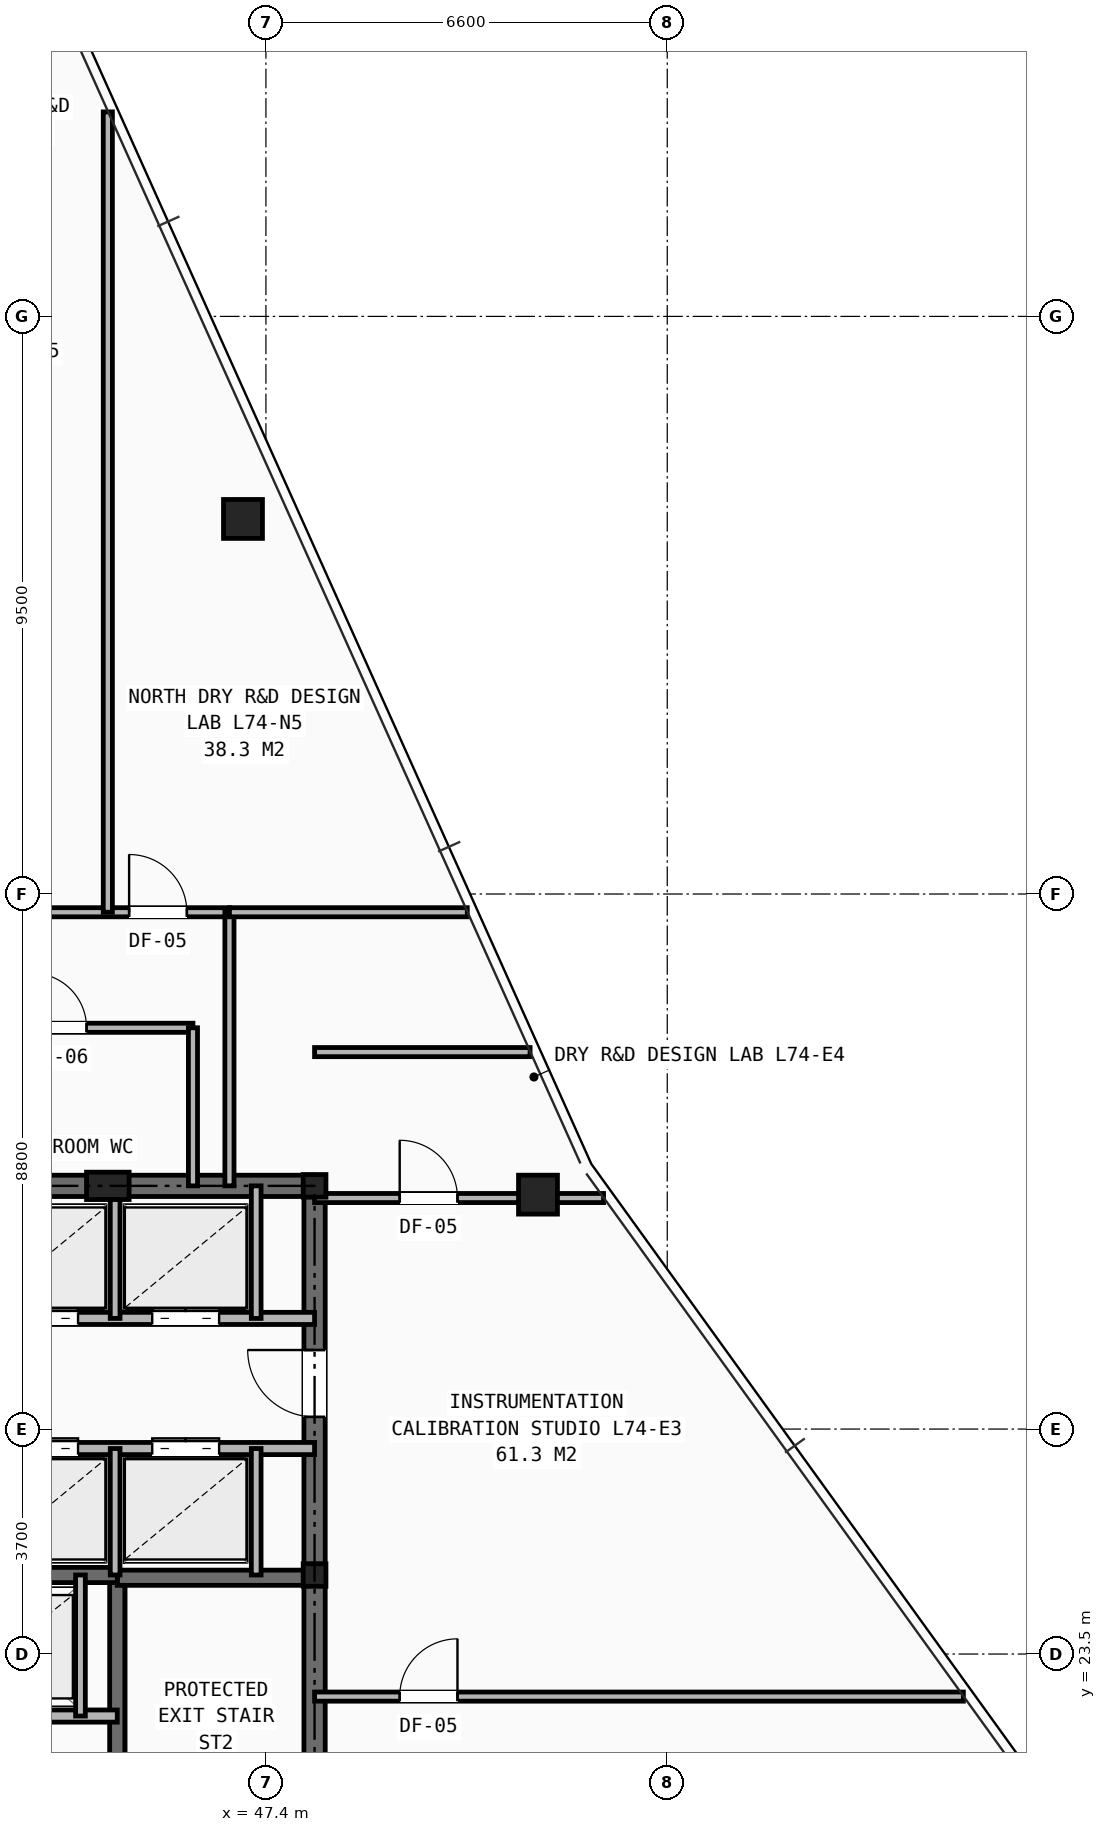
"""IFC4 building model, lengths in metres.
Left out: names, types, materials, properties, quantities, classifications, styles, units other than length and angle.
Written with IfcOpenShell. Run it as: python <this file> out.ifc"""

import sys

from ifc_helpers import new_model, si_unit, direction, frame, frame_2d, origin, origin_2d, place, context, subcontext, project, spatial, rectangle, hollow_rectangle, i_section, extrude, element, fill, save


model = new_model("IFC4")
c1 = context("Model", 3, precision=1e-05, world=origin(), true_north=direction((0.0, 1.0)))
c2 = subcontext(c1, "Body", "Model", "MODEL_VIEW")
j1 = project(units=[si_unit("LENGTHUNIT", "METRE"), si_unit("PLANEANGLEUNIT", "RADIAN")], contexts=[c1])
p1 = place(None, origin())
s1 = spatial("IfcSite", under=j1, at=p1, CompositionType="ELEMENT")
p2 = place(p1, origin())
s2 = spatial("IfcBuilding", under=s1, at=p2, CompositionType="ELEMENT")
p3 = place(p2, frame((0.0, 0.0, 262.0)))
s3 = spatial("IfcBuildingStorey", under=s2, at=p3, CompositionType="ELEMENT", Elevation=262.0)
for number, where, z_axis, x_axis in (
    (1, (48.2, 24.8, 0.0), (0.0, 0.0, 1.0), (1.0, 0.0, 0.0)),
    (2, (48.2, 31.2, 0.0), (0.0, 0.0, 1.0), (1.0, 0.0, 0.0)),
):
    element("IfcColumn", number, at=place(p3, frame(where, z_axis=z_axis, x_axis=x_axis)), inside=s3, PredefinedType="COLUMN", context=c2, shape_type="SweptSolid", body=[
        extrude(i_section(OverallWidth=0.374, OverallDepth=0.372, WebThickness=0.016, FlangeThickness=0.026, at=origin_2d()), origin(), (0.0, 0.0, 1.0), 3.5),
    ])
p4 = place(p3, frame((44.8, 31.2, 0.0), z_axis=(0.0, 0.0, 1.0), x_axis=(1.0, 0.0, 0.0)))
e3 = element("IfcColumn", 3, at=p4, inside=s3, PredefinedType="PILASTER", context=c2, shape_type="SweptSolid", body=[
    extrude(rectangle(XDim=0.7, YDim=0.45, at=origin_2d()), origin(), (0.0, 0.0, 1.0), 3.5),
])
for number, where, z_axis, x_axis in (
    (4, (51.874, 31.056, 0.0), (0.0, 0.0, 1.0), (1.0, 0.0, 0.0)),
    (5, (47.023, 42.169, 0.0), (0.0, 0.0, 1.0), (1.0, 0.0, 0.0)),
):
    element("IfcColumn", number, at=place(p3, frame(where, z_axis=z_axis, x_axis=x_axis)), inside=s3, PredefinedType="COLUMN", context=c2, shape_type="SweptSolid", body=[
        extrude(hollow_rectangle(XDim=0.64, YDim=0.64, WallThickness=0.045, at=origin_2d()), origin(), (0.0, 0.0, 1.0), 3.5),
    ])
p5 = place(p3, frame((31.8, 31.2, 0.0), z_axis=(0.0, 0.0, 1.0), x_axis=(1.0, 0.0, 0.0)))
e6 = element("IfcWall", 6, at=p5, inside=s3, PredefinedType="SHEAR", context=c2, shape_type="SweptSolid", body=[
    extrude(rectangle(XDim=16.4, YDim=0.35, at=frame_2d((8.2, 0.0))), origin(), (0.0, 0.0, 1.0), 3.25),
])
p6 = place(p3, frame((48.2, 16.4, 0.0), z_axis=(0.0, 0.0, 1.0), x_axis=(0.0, 1.0, 0.0)))
e7 = element("IfcWall", 7, at=p6, inside=s3, PredefinedType="SHEAR", context=c2, shape_type="SweptSolid", body=[
    extrude(rectangle(XDim=14.8, YDim=0.35, at=frame_2d((7.4, 0.0))), origin(), (0.0, 0.0, 1.0), 3.25),
])
p7 = place(p6, frame((11.0, 0.0, 0.0)))
e8 = element("IfcOpeningElement", 8, at=p7, cuts=e7, PredefinedType="OPENING", context=c2, shape_type="SweptSolid", body=[
    extrude(rectangle(XDim=1.1, YDim=2.15, at=frame_2d((0.55, 1.075))), frame((0.0, 0.185, 0.0), z_axis=(0.0, -1.0, 0.0), x_axis=(1.0, 0.0, 0.0)), (0.0, 0.0, 1.0), 0.37),
])
p8 = place(p3, frame((44.955, 16.4, 0.0), z_axis=(0.0, 0.0, 1.0), x_axis=(0.0, 1.0, 0.0)))
e9 = element("IfcWall", 9, at=p8, inside=s3, PredefinedType="SHEAR", context=c2, shape_type="SweptSolid", body=[
    extrude(rectangle(XDim=8.4, YDim=0.25, at=frame_2d((4.2, 0.0))), origin(), (0.0, 0.0, 1.0), 3.25),
])
p9 = place(p8, frame((0.45, 0.0, 0.0)))
e10 = element("IfcOpeningElement", 10, at=p9, cuts=e9, PredefinedType="OPENING", context=c2, shape_type="SweptSolid", body=[
    extrude(rectangle(XDim=0.95, YDim=2.1, at=frame_2d((0.475, 1.05))), frame((0.0, 0.135, 0.0), z_axis=(0.0, -1.0, 0.0), x_axis=(1.0, 0.0, 0.0)), (0.0, 0.0, 1.0), 0.27),
])
p10 = place(p3, frame((44.955, 24.755, 0.0), z_axis=(0.0, 0.0, 1.0), x_axis=(1.0, 0.0, 0.0)))
e11 = element("IfcWall", 11, at=p10, inside=s3, PredefinedType="SHEAR", context=c2, shape_type="SweptSolid", body=[
    extrude(rectangle(XDim=3.245, YDim=0.25, at=frame_2d((1.623, 0.0))), origin(), (0.0, 0.0, 1.0), 3.25),
])
p11 = place(p3, frame((35.045, 24.8, 0.0), z_axis=(0.0, 0.0, 1.0), x_axis=(1.0, 0.0, 0.0)))
e12 = element("IfcWall", 12, at=p11, inside=s3, PredefinedType="SHEAR", context=c2, shape_type="SweptSolid", body=[
    extrude(rectangle(XDim=9.91, YDim=0.25, at=frame_2d((4.955, 0.0))), origin(), (0.0, 0.0, 1.0), 3.25),
])
p12 = place(p3, frame((35.045, 22.48, 0.0), z_axis=(0.0, 0.0, 1.0), x_axis=(1.0, 0.0, 0.0)))
e13 = element("IfcWall", 13, at=p12, inside=s3, PredefinedType="SOLIDWALL", context=c2, shape_type="SweptSolid", body=[
    extrude(rectangle(XDim=9.91, YDim=0.2, at=frame_2d((4.955, 0.0))), origin(), (0.0, 0.0, 1.0), 3.25),
])
p13 = place(p12, frame((1.255, 0.0, 0.0)))
e14 = element("IfcOpeningElement", 14, at=p13, cuts=e13, PredefinedType="OPENING", context=c2, shape_type="SweptSolid", body=[
    extrude(rectangle(XDim=1.1, YDim=2.15, at=frame_2d((0.55, 1.075))), frame((0.0, 0.11, 0.0), z_axis=(0.0, -1.0, 0.0), x_axis=(1.0, 0.0, 0.0)), (0.0, 0.0, 1.0), 0.22),
])
p14 = place(p12, frame((7.555, 0.0, 0.0)))
e15 = element("IfcOpeningElement", 15, at=p14, cuts=e13, PredefinedType="OPENING", context=c2, shape_type="SweptSolid", body=[
    extrude(rectangle(XDim=1.1, YDim=2.15, at=frame_2d((0.55, 1.075))), frame((0.0, 0.11, 0.0), z_axis=(0.0, -1.0, 0.0), x_axis=(1.0, 0.0, 0.0)), (0.0, 0.0, 1.0), 0.22),
])
p15 = place(p12, frame((4.405, 0.0, 0.0)))
e16 = element("IfcOpeningElement", 16, at=p15, cuts=e13, PredefinedType="OPENING", context=c2, shape_type="SweptSolid", body=[
    extrude(rectangle(XDim=1.1, YDim=2.15, at=frame_2d((0.55, 1.075))), frame((0.0, 0.11, 0.0), z_axis=(0.0, -1.0, 0.0), x_axis=(1.0, 0.0, 0.0)), (0.0, 0.0, 1.0), 0.22),
])
p16 = place(p3, frame((44.35, 22.48, 0.0), z_axis=(0.0, 0.0, 1.0), x_axis=(0.0, 1.0, 0.0)))
e17 = element("IfcWall", 17, at=p16, inside=s3, PredefinedType="SOLIDWALL", context=c2, shape_type="SweptSolid", body=[
    extrude(rectangle(XDim=2.32, YDim=0.16, at=frame_2d((1.16, 0.0))), origin(), (0.0, 0.0, 1.0), 3.25),
])
p17 = place(p3, frame((31.8, 29.02, 0.0), z_axis=(0.0, 0.0, 1.0), x_axis=(1.0, 0.0, 0.0)))
e18 = element("IfcWall", 18, at=p17, inside=s3, PredefinedType="SOLIDWALL", context=c2, shape_type="SweptSolid", body=[
    extrude(rectangle(XDim=16.4, YDim=0.2, at=frame_2d((8.2, 0.0))), origin(), (0.0, 0.0, 1.0), 2.705),
])
p18 = place(p17, frame((0.55, 0.0, 0.0)))
e19 = element("IfcOpeningElement", 19, at=p18, cuts=e18, PredefinedType="OPENING", context=c2, shape_type="SweptSolid", body=[
    extrude(rectangle(XDim=0.85, YDim=2.05, at=frame_2d((0.425, 1.025))), frame((0.0, 0.11, 0.0), z_axis=(0.0, -1.0, 0.0), x_axis=(1.0, 0.0, 0.0)), (0.0, 0.0, 1.0), 0.22),
])
p19 = place(p17, frame((5.94, 0.0, 0.0)))
e20 = element("IfcOpeningElement", 20, at=p19, cuts=e18, PredefinedType="OPENING", context=c2, shape_type="SweptSolid", body=[
    extrude(rectangle(XDim=0.9, YDim=2.1, at=frame_2d((0.45, 1.05))), frame((0.0, 0.11, 0.0), z_axis=(0.0, -1.0, 0.0), x_axis=(1.0, 0.0, 0.0)), (0.0, 0.0, 1.0), 0.22),
])
p20 = place(p17, frame((11.41, 0.0, 0.0)))
e21 = element("IfcOpeningElement", 21, at=p20, cuts=e18, PredefinedType="OPENING", context=c2, shape_type="SweptSolid", body=[
    extrude(rectangle(XDim=1.1, YDim=2.15, at=frame_2d((0.55, 1.075))), frame((0.0, 0.11, 0.0), z_axis=(0.0, -1.0, 0.0), x_axis=(1.0, 0.0, 0.0)), (0.0, 0.0, 1.0), 0.22),
])
p21 = place(p17, frame((13.73, 0.0, 0.0)))
e22 = element("IfcOpeningElement", 22, at=p21, cuts=e18, PredefinedType="OPENING", context=c2, shape_type="SweptSolid", body=[
    extrude(rectangle(XDim=1.1, YDim=2.15, at=frame_2d((0.55, 1.075))), frame((0.0, 0.11, 0.0), z_axis=(0.0, -1.0, 0.0), x_axis=(1.0, 0.0, 0.0)), (0.0, 0.0, 1.0), 0.22),
])
p22 = place(p3, frame((31.8, 26.88, 0.0), z_axis=(0.0, 0.0, 1.0), x_axis=(1.0, 0.0, 0.0)))
e23 = element("IfcWall", 23, at=p22, inside=s3, PredefinedType="SOLIDWALL", context=c2, shape_type="SweptSolid", body=[
    extrude(rectangle(XDim=16.4, YDim=0.2, at=frame_2d((8.2, 0.0))), origin(), (0.0, 0.0, 1.0), 2.705),
])
p23 = place(p22, frame((0.55, 0.0, 0.0)))
e24 = element("IfcOpeningElement", 24, at=p23, cuts=e23, PredefinedType="OPENING", context=c2, shape_type="SweptSolid", body=[
    extrude(rectangle(XDim=0.85, YDim=2.05, at=frame_2d((0.425, 1.025))), frame((0.0, 0.11, 0.0), z_axis=(0.0, -1.0, 0.0), x_axis=(1.0, 0.0, 0.0)), (0.0, 0.0, 1.0), 0.22),
])
p24 = place(p22, frame((5.94, 0.0, 0.0)))
e25 = element("IfcOpeningElement", 25, at=p24, cuts=e23, PredefinedType="OPENING", context=c2, shape_type="SweptSolid", body=[
    extrude(rectangle(XDim=0.9, YDim=2.1, at=frame_2d((0.45, 1.05))), frame((0.0, 0.11, 0.0), z_axis=(0.0, -1.0, 0.0), x_axis=(1.0, 0.0, 0.0)), (0.0, 0.0, 1.0), 0.22),
])
p25 = place(p22, frame((11.41, 0.0, 0.0)))
e26 = element("IfcOpeningElement", 26, at=p25, cuts=e23, PredefinedType="OPENING", context=c2, shape_type="SweptSolid", body=[
    extrude(rectangle(XDim=1.1, YDim=2.15, at=frame_2d((0.55, 1.075))), frame((0.0, 0.11, 0.0), z_axis=(0.0, -1.0, 0.0), x_axis=(1.0, 0.0, 0.0)), (0.0, 0.0, 1.0), 0.22),
])
p26 = place(p22, frame((13.73, 0.0, 0.0)))
e27 = element("IfcOpeningElement", 27, at=p26, cuts=e23, PredefinedType="OPENING", context=c2, shape_type="SweptSolid", body=[
    extrude(rectangle(XDim=1.1, YDim=2.15, at=frame_2d((0.55, 1.075))), frame((0.0, 0.11, 0.0), z_axis=(0.0, -1.0, 0.0), x_axis=(1.0, 0.0, 0.0)), (0.0, 0.0, 1.0), 0.22),
])
for number, where, z_axis, x_axis in (
    (28, (44.92, 29.02, 0.0), (0.0, 0.0, 1.0), (0.0, 1.0, 0.0)),
    (29, (47.24, 29.02, 0.0), (0.0, 0.0, 1.0), (0.0, 1.0, 0.0)),
):
    element("IfcWall", number, at=place(p3, frame(where, z_axis=z_axis, x_axis=x_axis)), inside=s3, PredefinedType="SOLIDWALL", context=c2, shape_type="SweptSolid", body=[
        extrude(rectangle(XDim=2.18, YDim=0.16, at=frame_2d((1.09, 0.0))), origin(), (0.0, 0.0, 1.0), 2.705),
    ])
for number, where, z_axis, x_axis in (
    (30, (44.92, 24.8, 0.0), (0.0, 0.0, 1.0), (0.0, 1.0, 0.0)),
    (31, (47.24, 24.8, 0.0), (0.0, 0.0, 1.0), (0.0, 1.0, 0.0)),
):
    element("IfcWall", number, at=place(p3, frame(where, z_axis=z_axis, x_axis=x_axis)), inside=s3, PredefinedType="SOLIDWALL", context=c2, shape_type="SweptSolid", body=[
        extrude(rectangle(XDim=2.08, YDim=0.16, at=frame_2d((1.04, 0.0))), origin(), (0.0, 0.0, 1.0), 3.25),
    ])
p27 = place(p3, frame((33.2, 33.8, 0.0), z_axis=(0.0, 0.0, 1.0), x_axis=(1.0, 0.0, 0.0)))
e32 = element("IfcWall", 32, at=p27, inside=s3, PredefinedType="PARTITIONING", context=c2, shape_type="SweptSolid", body=[
    extrude(rectangle(XDim=13.0, YDim=0.15, at=frame_2d((6.5, 0.0))), origin(), (0.0, 0.0, 1.0), 3.25),
])
p28 = place(p27, frame((1.7, 0.0, 0.0)))
e33 = element("IfcOpeningElement", 33, at=p28, cuts=e32, PredefinedType="OPENING", context=c2, shape_type="SweptSolid", body=[
    extrude(rectangle(XDim=0.9, YDim=2.1, at=frame_2d((0.45, 1.05))), frame((0.0, 0.085, 0.0), z_axis=(0.0, -1.0, 0.0), x_axis=(1.0, 0.0, 0.0)), (0.0, 0.0, 1.0), 0.17),
])
p29 = place(p27, frame((6.0, 0.0, 0.0)))
e34 = element("IfcOpeningElement", 34, at=p29, cuts=e32, PredefinedType="OPENING", context=c2, shape_type="SweptSolid", body=[
    extrude(rectangle(XDim=0.9, YDim=2.1, at=frame_2d((0.45, 1.05))), frame((0.0, 0.085, 0.0), z_axis=(0.0, -1.0, 0.0), x_axis=(1.0, 0.0, 0.0)), (0.0, 0.0, 1.0), 0.17),
])
p30 = place(p27, frame((10.35, 0.0, 0.0)))
e35 = element("IfcOpeningElement", 35, at=p30, cuts=e32, PredefinedType="OPENING", context=c2, shape_type="SweptSolid", body=[
    extrude(rectangle(XDim=0.9, YDim=2.1, at=frame_2d((0.45, 1.05))), frame((0.0, 0.085, 0.0), z_axis=(0.0, -1.0, 0.0), x_axis=(1.0, 0.0, 0.0)), (0.0, 0.0, 1.0), 0.17),
])
p31 = place(p3, frame((46.2, 31.2, 0.0), z_axis=(0.0, 0.0, 1.0), x_axis=(0.0, 1.0, 0.0)))
e36 = element("IfcWall", 36, at=p31, inside=s3, PredefinedType="PARTITIONING", context=c2, shape_type="SweptSolid", body=[
    extrude(rectangle(XDim=2.6, YDim=0.15, at=frame_2d((1.3, 0.0))), origin(), (0.0, 0.0, 1.0), 2.705),
])
p32 = place(p3, frame((40.75, 35.7, 0.0), z_axis=(0.0, 0.0, 1.0), x_axis=(1.0, 0.0, 0.0)))
e37 = element("IfcWall", 37, at=p32, inside=s3, PredefinedType="PARTITIONING", context=c2, shape_type="SweptSolid", body=[
    extrude(rectangle(XDim=6.05, YDim=0.15, at=frame_2d((3.025, 0.0))), origin(), (0.0, 0.0, 1.0), 3.25),
])
p33 = place(p32, frame((0.6, 0.0, 0.0)))
e38 = element("IfcOpeningElement", 38, at=p33, cuts=e37, PredefinedType="OPENING", context=c2, shape_type="SweptSolid", body=[
    extrude(rectangle(XDim=0.95, YDim=2.1, at=frame_2d((0.475, 1.05))), frame((0.0, 0.085, 0.0), z_axis=(0.0, -1.0, 0.0), x_axis=(1.0, 0.0, 0.0)), (0.0, 0.0, 1.0), 0.17),
])
p34 = place(p32, frame((4.4, 0.0, 0.0)))
e39 = element("IfcOpeningElement", 39, at=p34, cuts=e37, PredefinedType="OPENING", context=c2, shape_type="SweptSolid", body=[
    extrude(rectangle(XDim=0.95, YDim=2.1, at=frame_2d((0.475, 1.05))), frame((0.0, 0.085, 0.0), z_axis=(0.0, -1.0, 0.0), x_axis=(1.0, 0.0, 0.0)), (0.0, 0.0, 1.0), 0.17),
])
p35 = place(p3, frame((46.8, 31.2, 0.0), z_axis=(0.0, 0.0, 1.0), x_axis=(0.0, 1.0, 0.0)))
e40 = element("IfcWall", 40, at=p35, inside=s3, PredefinedType="PARTITIONING", context=c2, shape_type="SweptSolid", body=[
    extrude(rectangle(XDim=4.5, YDim=0.15, at=frame_2d((2.25, 0.0))), origin(), (0.0, 0.0, 1.0), 2.705),
])
p36 = place(p3, frame((46.8, 35.7, 0.0), z_axis=(0.0, 0.0, 1.0), x_axis=(1.0, 0.0, 0.0)))
e41 = element("IfcWall", 41, at=p36, inside=s3, PredefinedType="PARTITIONING", context=c2, shape_type="SweptSolid", body=[
    extrude(rectangle(XDim=3.911, YDim=0.15, at=frame_2d((1.956, 0.0))), origin(), (0.0, 0.0, 1.0), 2.628),
])
p37 = place(p3, frame((48.2, 22.8, 0.0), z_axis=(0.0, 0.0, 1.0), x_axis=(1.0, 0.0, 0.0)))
e42 = element("IfcWall", 42, at=p37, inside=s3, PredefinedType="PARTITIONING", context=c2, shape_type="SweptSolid", body=[
    extrude(rectangle(XDim=10.67, YDim=0.15, at=frame_2d((5.335, 0.0))), origin(), (0.0, 0.0, 1.0), 2.628),
])
p38 = place(p37, frame((1.4, 0.0, 0.0)))
e43 = element("IfcOpeningElement", 43, at=p38, cuts=e42, PredefinedType="OPENING", context=c2, shape_type="SweptSolid", body=[
    extrude(rectangle(XDim=0.95, YDim=2.1, at=frame_2d((0.475, 1.05))), frame((0.0, 0.085, 0.0), z_axis=(0.0, -1.0, 0.0), x_axis=(1.0, 0.0, 0.0)), (0.0, 0.0, 1.0), 0.17),
])
p39 = place(p3, frame((48.2, 31.0, 0.0), z_axis=(0.0, 0.0, 1.0), x_axis=(1.0, 0.0, 0.0)))
e44 = element("IfcWall", 44, at=p39, inside=s3, PredefinedType="PARTITIONING", context=c2, shape_type="SweptSolid", body=[
    extrude(rectangle(XDim=4.752, YDim=0.15, at=frame_2d((2.376, 0.0))), origin(), (0.0, 0.0, 1.0), 2.265),
])
p40 = place(p39, frame((1.4, 0.0, 0.0)))
e45 = element("IfcOpeningElement", 45, at=p40, cuts=e44, PredefinedType="OPENING", context=c2, shape_type="SweptSolid", body=[
    extrude(rectangle(XDim=0.95, YDim=2.1, at=frame_2d((0.475, 1.05))), frame((0.0, 0.085, 0.0), z_axis=(0.0, -1.0, 0.0), x_axis=(1.0, 0.0, 0.0)), (0.0, 0.0, 1.0), 0.17),
])
p41 = place(p3, frame((48.2, 33.4, 0.0), z_axis=(0.0, 0.0, 1.0), x_axis=(1.0, 0.0, 0.0)))
e46 = element("IfcWall", 46, at=p41, inside=s3, PredefinedType="PARTITIONING", context=c2, shape_type="SweptSolid", body=[
    extrude(rectangle(XDim=3.544, YDim=0.15, at=frame_2d((1.772, 0.0))), origin(), (0.0, 0.0, 1.0), 2.628),
])
p42 = place(p3, frame((44.8, 35.7, 0.0), z_axis=(0.0, 0.0, 1.0), x_axis=(0.0, 1.0, 0.0)))
e47 = element("IfcWall", 47, at=p42, inside=s3, PredefinedType="PARTITIONING", context=c2, shape_type="SweptSolid", body=[
    extrude(rectangle(XDim=13.163, YDim=0.15, at=frame_2d((6.582, 0.0))), origin(), (0.0, 0.0, 1.0), 2.265),
])
p43 = place(p7, origin())
e48 = element("IfcDoor", 48, at=p43, inside=s3, OperationType="SINGLE_SWING_RIGHT", PredefinedType="DOOR", context=c2, shape_type="SweptSolid", body=[
    extrude(rectangle(XDim=1.1, YDim=2.15, at=frame_2d((0.55, 1.075))), frame((0.0, 0.025, 0.0), z_axis=(0.0, -1.0, 0.0), x_axis=(1.0, 0.0, 0.0)), (0.0, 0.0, 1.0), 0.05),
])
fill(e8, e48)
p44 = place(p20, origin())
e49 = element("IfcDoor", 49, at=p44, inside=s3, OperationType="DOUBLE_DOOR_SLIDING", PredefinedType="DOOR", context=c2, shape_type="SweptSolid", body=[
    extrude(rectangle(XDim=1.1, YDim=2.15, at=frame_2d((0.55, 1.075))), frame((0.0, 0.025, 0.0), z_axis=(0.0, -1.0, 0.0), x_axis=(1.0, 0.0, 0.0)), (0.0, 0.0, 1.0), 0.05),
])
fill(e21, e49)
p45 = place(p21, origin())
e50 = element("IfcDoor", 50, at=p45, inside=s3, OperationType="DOUBLE_DOOR_SLIDING", PredefinedType="DOOR", context=c2, shape_type="SweptSolid", body=[
    extrude(rectangle(XDim=1.1, YDim=2.15, at=frame_2d((0.55, 1.075))), frame((0.0, 0.025, 0.0), z_axis=(0.0, -1.0, 0.0), x_axis=(1.0, 0.0, 0.0)), (0.0, 0.0, 1.0), 0.05),
])
fill(e22, e50)
p46 = place(p25, origin())
e51 = element("IfcDoor", 51, at=p46, inside=s3, OperationType="DOUBLE_DOOR_SLIDING", PredefinedType="DOOR", context=c2, shape_type="SweptSolid", body=[
    extrude(rectangle(XDim=1.1, YDim=2.15, at=frame_2d((0.55, 1.075))), frame((0.0, 0.025, 0.0), z_axis=(0.0, -1.0, 0.0), x_axis=(1.0, 0.0, 0.0)), (0.0, 0.0, 1.0), 0.05),
])
fill(e26, e51)
p47 = place(p26, origin())
e52 = element("IfcDoor", 52, at=p47, inside=s3, OperationType="DOUBLE_DOOR_SLIDING", PredefinedType="DOOR", context=c2, shape_type="SweptSolid", body=[
    extrude(rectangle(XDim=1.1, YDim=2.15, at=frame_2d((0.55, 1.075))), frame((0.0, 0.025, 0.0), z_axis=(0.0, -1.0, 0.0), x_axis=(1.0, 0.0, 0.0)), (0.0, 0.0, 1.0), 0.05),
])
fill(e27, e52)
p48 = place(p30, origin())
e53 = element("IfcDoor", 53, at=p48, inside=s3, OperationType="SINGLE_SWING_LEFT", PredefinedType="DOOR", context=c2, shape_type="SweptSolid", body=[
    extrude(rectangle(XDim=0.9, YDim=2.1, at=frame_2d((0.45, 1.05))), frame((0.0, 0.025, 0.0), z_axis=(0.0, -1.0, 0.0), x_axis=(1.0, 0.0, 0.0)), (0.0, 0.0, 1.0), 0.05),
])
fill(e35, e53)
p49 = place(p38, origin())
e54 = element("IfcDoor", 54, at=p49, inside=s3, OperationType="SINGLE_SWING_RIGHT", PredefinedType="DOOR", context=c2, shape_type="SweptSolid", body=[
    extrude(rectangle(XDim=0.95, YDim=2.1, at=frame_2d((0.475, 1.05))), frame((0.0, 0.025, 0.0), z_axis=(0.0, -1.0, 0.0), x_axis=(1.0, 0.0, 0.0)), (0.0, 0.0, 1.0), 0.05),
])
fill(e43, e54)
p50 = place(p40, origin())
e55 = element("IfcDoor", 55, at=p50, inside=s3, OperationType="SINGLE_SWING_LEFT", PredefinedType="DOOR", context=c2, shape_type="SweptSolid", body=[
    extrude(rectangle(XDim=0.95, YDim=2.1, at=frame_2d((0.475, 1.05))), frame((0.0, 0.025, 0.0), z_axis=(0.0, -1.0, 0.0), x_axis=(1.0, 0.0, 0.0)), (0.0, 0.0, 1.0), 0.05),
])
fill(e45, e55)
p51 = place(p34, origin())
e56 = element("IfcDoor", 56, at=p51, inside=s3, OperationType="SINGLE_SWING_LEFT", PredefinedType="DOOR", context=c2, shape_type="SweptSolid", body=[
    extrude(rectangle(XDim=0.95, YDim=2.1, at=frame_2d((0.475, 1.05))), frame((0.0, 0.025, 0.0), z_axis=(0.0, -1.0, 0.0), x_axis=(1.0, 0.0, 0.0)), (0.0, 0.0, 1.0), 0.05),
])
fill(e39, e56)
save(model, sys.argv[1])
